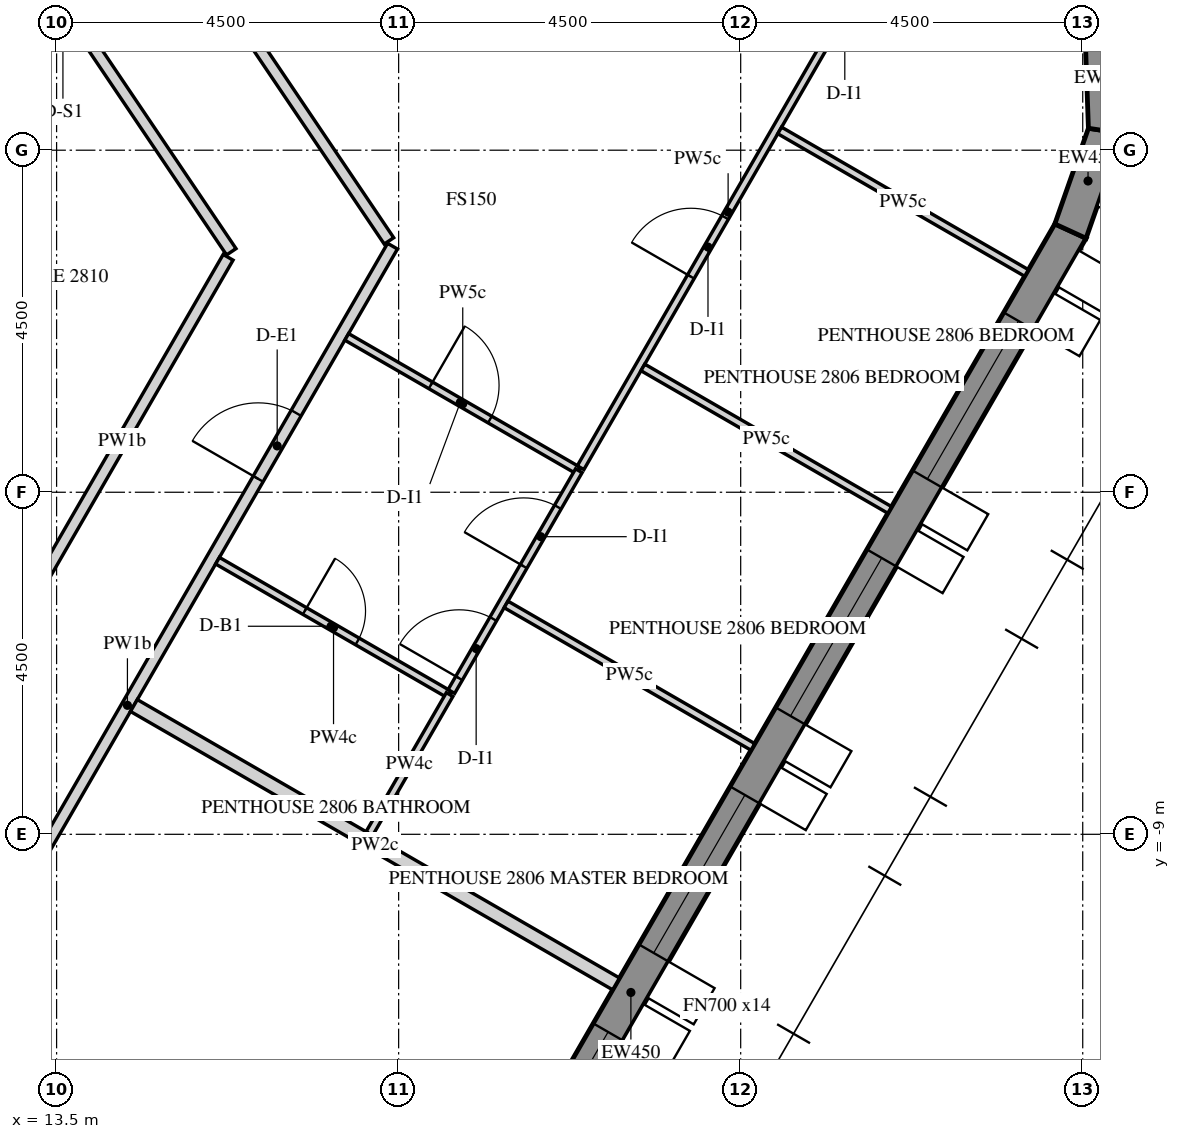
"""IFC4 building model, lengths in metres.
Left out: names, types, materials, properties, quantities, classifications, styles, units other than length and angle.
Written with IfcOpenShell. Run it as: python <this file> out.ifc"""

import sys

from ifc_helpers import new_model, si_unit, direction, frame, frame_2d, origin, place, context, subcontext, project, spatial, polyline, rectangle, outline, extrude, element, fill, save


model = new_model("IFC4")
c1 = context("Model", 3, precision=1e-05, world=origin(), true_north=direction((0.0, 1.0)))
c2 = subcontext(c1, "Body", "Model", "MODEL_VIEW")
j1 = project(units=[si_unit("LENGTHUNIT", "METRE"), si_unit("PLANEANGLEUNIT", "RADIAN")], contexts=[c1])
p1 = place(None, origin())
s1 = spatial("IfcSite", under=j1, at=p1, CompositionType="ELEMENT")
p2 = place(p1, origin())
s2 = spatial("IfcBuilding", under=s1, at=p2, CompositionType="ELEMENT")
p3 = place(p2, frame((0.0, 0.0, 361.2)))
s3 = spatial("IfcBuildingStorey", under=s2, at=p3, CompositionType="ELEMENT", Elevation=361.2)
p4 = place(p3, frame((15.273, -21.097, -0.15), z_axis=(0.0, 0.0, 1.0), x_axis=(0.499997453958, 0.866026873738, 0.0)))
e1 = element("IfcWall", 1, at=p4, inside=s3, PredefinedType="SOLIDWALL", context=c2, shape_type="SweptSolid", body=[
    extrude(outline(polyline([(-0.018, -0.225), (23.152, -0.225), (23.11, 0.225), (0.018, 0.225), (-0.018, -0.225)])), origin(), (0.0, 0.0, 1.0), 3.9),
])
p5 = place(p4, frame((1.366, 0.0, 0.45)))
e2 = element("IfcOpeningElement", 2, at=p5, cuts=e1, PredefinedType="OPENING", context=c2, shape_type="SweptSolid", body=[
    extrude(rectangle(XDim=2.4, YDim=3.0, at=frame_2d((1.2, 1.5))), frame((0.0, 0.235, 0.0), z_axis=(0.0, -1.0, 0.0), x_axis=(1.0, 0.0, 0.0)), (0.0, 0.0, 1.0), 0.47),
])
p6 = place(p4, frame((4.966, 0.0, 0.45)))
e3 = element("IfcOpeningElement", 3, at=p6, cuts=e1, PredefinedType="OPENING", context=c2, shape_type="SweptSolid", body=[
    extrude(rectangle(XDim=2.4, YDim=3.0, at=frame_2d((1.2, 1.5))), frame((0.0, 0.235, 0.0), z_axis=(0.0, -1.0, 0.0), x_axis=(1.0, 0.0, 0.0)), (0.0, 0.0, 1.0), 0.47),
])
p7 = place(p4, frame((8.566, 0.0, 0.45)))
e4 = element("IfcOpeningElement", 4, at=p7, cuts=e1, PredefinedType="OPENING", context=c2, shape_type="SweptSolid", body=[
    extrude(rectangle(XDim=2.4, YDim=3.0, at=frame_2d((1.2, 1.5))), frame((0.0, 0.235, 0.0), z_axis=(0.0, -1.0, 0.0), x_axis=(1.0, 0.0, 0.0)), (0.0, 0.0, 1.0), 0.47),
])
p8 = place(p4, frame((12.166, 0.0, 0.45)))
e5 = element("IfcOpeningElement", 5, at=p8, cuts=e1, PredefinedType="OPENING", context=c2, shape_type="SweptSolid", body=[
    extrude(rectangle(XDim=2.4, YDim=3.0, at=frame_2d((1.2, 1.5))), frame((0.0, 0.235, 0.0), z_axis=(0.0, -1.0, 0.0), x_axis=(1.0, 0.0, 0.0)), (0.0, 0.0, 1.0), 0.47),
])
p9 = place(p4, frame((15.766, 0.0, 0.45)))
e6 = element("IfcOpeningElement", 6, at=p9, cuts=e1, PredefinedType="OPENING", context=c2, shape_type="SweptSolid", body=[
    extrude(rectangle(XDim=2.4, YDim=3.0, at=frame_2d((1.2, 1.5))), frame((0.0, 0.235, 0.0), z_axis=(0.0, -1.0, 0.0), x_axis=(1.0, 0.0, 0.0)), (0.0, 0.0, 1.0), 0.47),
])
p10 = place(p4, frame((19.366, 0.0, 0.45)))
e7 = element("IfcOpeningElement", 7, at=p10, cuts=e1, PredefinedType="OPENING", context=c2, shape_type="SweptSolid", body=[
    extrude(rectangle(XDim=2.4, YDim=3.0, at=frame_2d((1.2, 1.5))), frame((0.0, 0.235, 0.0), z_axis=(0.0, -1.0, 0.0), x_axis=(1.0, 0.0, 0.0)), (0.0, 0.0, 1.0), 0.47),
])
p11 = place(p3, frame((26.838, -1.064, -0.15), z_axis=(0.0, 0.0, 1.0), x_axis=(0.331074067573, 0.943604769901, 0.0)))
e8 = element("IfcWall", 8, at=p11, inside=s3, PredefinedType="SOLIDWALL", context=c2, shape_type="SweptSolid", body=[
    extrude(outline(polyline([(-0.021, -0.225), (1.44, -0.225), (1.355, 0.225), (0.021, 0.225), (-0.021, -0.225)])), origin(), (0.0, 0.0, 1.0), 3.9),
])
p12 = place(p3, frame((27.301, 0.254, -0.15), z_axis=(0.0, 0.0, 1.0), x_axis=(-0.034763104447, 0.999395580623, 0.0)))
e9 = element("IfcWall", 9, at=p12, inside=s3, PredefinedType="SOLIDWALL", context=c2, shape_type="SweptSolid", body=[
    extrude(outline(polyline([(-0.042, -0.225), (1.44, -0.225), (1.355, 0.225), (0.042, 0.225), (-0.042, -0.225)])), origin(), (0.0, 0.0, 1.0), 3.9),
])
p13 = place(p3, frame((10.944, -13.344, 0.0), z_axis=(0.0, 0.0, 1.0), x_axis=(0.500003210163, 0.866023550388, 0.0)))
e10 = element("IfcWall", 10, at=p13, inside=s3, PredefinedType="PARTITIONING", context=c2, shape_type="SweptSolid", body=[
    extrude(rectangle(XDim=13.951, YDim=0.15, at=frame_2d((6.975, 0.0))), origin(), (0.0, 0.0, 1.0), 2.82),
])
p14 = place(p13, frame((1.116, 0.0, 0.0)))
e11 = element("IfcOpeningElement", 11, at=p14, cuts=e10, PredefinedType="OPENING", context=c2, shape_type="SweptSolid", body=[
    extrude(rectangle(XDim=1.0, YDim=2.1, at=frame_2d((0.5, 1.05))), frame((0.0, 0.085, 0.0), z_axis=(0.0, -1.0, 0.0), x_axis=(1.0, 0.0, 0.0)), (0.0, 0.0, 1.0), 0.17),
])
p15 = place(p13, frame((10.416, 0.0, 0.0)))
e12 = element("IfcOpeningElement", 12, at=p15, cuts=e10, PredefinedType="OPENING", context=c2, shape_type="SweptSolid", body=[
    extrude(rectangle(XDim=1.0, YDim=2.1, at=frame_2d((0.5, 1.05))), frame((0.0, 0.085, 0.0), z_axis=(0.0, -1.0, 0.0), x_axis=(1.0, 0.0, 0.0)), (0.0, 0.0, 1.0), 0.17),
])
p16 = place(p3, frame((17.873, -1.193, 0.0), z_axis=(0.0, 0.0, 1.0), x_axis=(-0.559188435605, 0.829040586151, 0.0)))
e13 = element("IfcWall", 13, at=p16, inside=s3, PredefinedType="PARTITIONING", context=c2, shape_type="SweptSolid", body=[
    extrude(rectangle(XDim=15.688, YDim=0.15, at=frame_2d((7.844, 0.0))), origin(), (0.0, 0.0, 1.0), 2.82),
])
p17 = place(p3, frame((11.368, 5.231, 0.0), z_axis=(0.0, 0.0, 1.0), x_axis=(0.55919388604, -0.829036909803, 0.0)))
e14 = element("IfcWall", 14, at=p17, inside=s3, PredefinedType="PARTITIONING", context=c2, shape_type="SweptSolid", body=[
    extrude(rectangle(XDim=7.922, YDim=0.15, at=frame_2d((3.961, 0.0))), origin(), (0.0, 0.0, 1.0), 2.82),
])
p18 = place(p17, frame((3.511, 0.0, 0.0)))
e15 = element("IfcOpeningElement", 15, at=p18, cuts=e14, PredefinedType="OPENING", context=c2, shape_type="SweptSolid", body=[
    extrude(rectangle(XDim=0.9, YDim=2.1, at=frame_2d((0.45, 1.05))), frame((0.0, 0.085, 0.0), z_axis=(0.0, -1.0, 0.0), x_axis=(1.0, 0.0, 0.0)), (0.0, 0.0, 1.0), 0.17),
])
p19 = place(p3, frame((15.757, -1.409, 0.0), z_axis=(0.0, 0.0, 1.0), x_axis=(-0.500002739321, -0.866023822231, 0.0)))
e16 = element("IfcWall", 16, at=p19, inside=s3, PredefinedType="PARTITIONING", context=c2, shape_type="SweptSolid", body=[
    extrude(rectangle(XDim=5.58, YDim=0.15, at=frame_2d((2.79, 0.0))), origin(), (0.0, 0.0, 1.0), 2.82),
])
p20 = place(p3, frame((20.861, -10.968, 0.0), z_axis=(0.0, 0.0, 1.0), x_axis=(-0.866015186145, 0.500017697054, 0.0)))
e17 = element("IfcWall", 17, at=p20, inside=s3, PredefinedType="PARTITIONING", context=c2, shape_type="SweptSolid", body=[
    extrude(rectangle(XDim=7.325, YDim=0.18, at=frame_2d((3.663, 0.0))), origin(), (0.0, 0.0, 1.0), 2.82),
])
p21 = place(p3, frame((17.317, -2.456, 0.0), z_axis=(0.0, 0.0, 1.0), x_axis=(0.866031034943, -0.499990246421, 0.0)))
e18 = element("IfcWall", 18, at=p21, inside=s3, PredefinedType="PARTITIONING", context=c2, shape_type="SweptSolid", body=[
    extrude(rectangle(XDim=3.525, YDim=0.1, at=frame_2d((1.762, 0.0))), origin(), (0.0, 0.0, 1.0), 2.82),
])
p22 = place(p21, frame((1.275, 0.0, 0.0)))
e19 = element("IfcOpeningElement", 19, at=p22, cuts=e18, PredefinedType="OPENING", context=c2, shape_type="SweptSolid", body=[
    extrude(rectangle(XDim=0.9, YDim=2.1, at=frame_2d((0.45, 1.05))), frame((0.0, 0.06, 0.0), z_axis=(0.0, -1.0, 0.0), x_axis=(1.0, 0.0, 0.0)), (0.0, 0.0, 1.0), 0.12),
])
p23 = place(p3, frame((20.394, -4.177, 0.0), z_axis=(0.0, 0.0, 1.0), x_axis=(0.499991012162, 0.866030592853, 0.0)))
e20 = element("IfcWall", 20, at=p23, inside=s3, PredefinedType="PARTITIONING", context=c2, shape_type="SweptSolid", body=[
    extrude(rectangle(XDim=7.764, YDim=0.1, at=frame_2d((3.882, 0.0))), origin(), (0.0, 0.0, 1.0), 2.82),
])
p24 = place(p23, frame((2.902, 0.0, 0.0)))
e21 = element("IfcOpeningElement", 21, at=p24, cuts=e20, PredefinedType="OPENING", context=c2, shape_type="SweptSolid", body=[
    extrude(rectangle(XDim=0.9, YDim=2.1, at=frame_2d((0.45, 1.05))), frame((0.0, 0.06, 0.0), z_axis=(0.0, -1.0, 0.0), x_axis=(1.0, 0.0, 0.0)), (0.0, 0.0, 1.0), 0.12),
])
p25 = place(p23, frame((6.502, 0.0, 0.0)))
e22 = element("IfcOpeningElement", 22, at=p25, cuts=e20, PredefinedType="OPENING", context=c2, shape_type="SweptSolid", body=[
    extrude(rectangle(XDim=0.9, YDim=2.1, at=frame_2d((0.45, 1.05))), frame((0.0, 0.06, 0.0), z_axis=(0.0, -1.0, 0.0), x_axis=(1.0, 0.0, 0.0)), (0.0, 0.0, 1.0), 0.12),
])
p26 = place(p3, frame((15.617, -5.4, 0.0), z_axis=(0.0, 0.0, 1.0), x_axis=(0.866031034943, -0.499990246421, 0.0)))
e23 = element("IfcWall", 23, at=p26, inside=s3, PredefinedType="PARTITIONING", context=c2, shape_type="SweptSolid", body=[
    extrude(rectangle(XDim=3.525, YDim=0.1, at=frame_2d((1.762, 0.0))), origin(), (0.0, 0.0, 1.0), 2.82),
])
p27 = place(p26, frame((1.325, 0.0, 0.0)))
e24 = element("IfcOpeningElement", 24, at=p27, cuts=e23, PredefinedType="OPENING", context=c2, shape_type="SweptSolid", body=[
    extrude(rectangle(XDim=0.8, YDim=2.1, at=frame_2d((0.4, 1.05))), frame((0.0, 0.06, 0.0), z_axis=(0.0, -1.0, 0.0), x_axis=(1.0, 0.0, 0.0)), (0.0, 0.0, 1.0), 0.12),
])
p28 = place(p3, frame((18.694, -7.121, 0.0), z_axis=(0.0, 0.0, 1.0), x_axis=(0.500014404596, 0.866017087127, 0.0)))
e25 = element("IfcWall", 25, at=p28, inside=s3, PredefinedType="PARTITIONING", context=c2, shape_type="SweptSolid", body=[
    extrude(rectangle(XDim=3.354, YDim=0.1, at=frame_2d((1.677, 0.0))), origin(), (0.0, 0.0, 1.0), 2.82),
])
p29 = place(p28, frame((0.202, 0.0, 0.0)))
e26 = element("IfcOpeningElement", 26, at=p29, cuts=e25, PredefinedType="OPENING", context=c2, shape_type="SweptSolid", body=[
    extrude(rectangle(XDim=0.9, YDim=2.1, at=frame_2d((0.45, 1.05))), frame((0.0, 0.06, 0.0), z_axis=(0.0, -1.0, 0.0), x_axis=(1.0, 0.0, 0.0)), (0.0, 0.0, 1.0), 0.12),
])
p30 = place(p28, frame((1.902, 0.0, 0.0)))
e27 = element("IfcOpeningElement", 27, at=p30, cuts=e25, PredefinedType="OPENING", context=c2, shape_type="SweptSolid", body=[
    extrude(rectangle(XDim=0.9, YDim=2.1, at=frame_2d((0.45, 1.05))), frame((0.0, 0.06, 0.0), z_axis=(0.0, -1.0, 0.0), x_axis=(1.0, 0.0, 0.0)), (0.0, 0.0, 1.0), 0.12),
])
p31 = place(p3, frame((17.615, -8.99, 0.0), z_axis=(0.0, 0.0, 1.0), x_axis=(0.500042633337, 0.866000788017, 0.0)))
e28 = element("IfcWall", 28, at=p31, inside=s3, PredefinedType="PARTITIONING", context=c2, shape_type="SweptSolid", body=[
    extrude(rectangle(XDim=2.112, YDim=0.1, at=frame_2d((1.056, 0.0))), origin(), (0.0, 0.0, 1.0), 2.82),
])
for number, where, z_axis, x_axis in (
    (29, (22.661, -7.851, 0.0), (0.0, 0.0, 1.0), (-0.866, 0.5, 0.0)),
    (30, (24.461, -4.733, 0.0), (0.0, 0.0, 1.0), (-0.866, 0.5, 0.0)),
    (31, (26.261, -1.615, 0.0), (0.0, 0.0, 1.0), (-0.866, 0.5, 0.0)),
):
    element("IfcWall", number, at=place(p3, frame(where, z_axis=z_axis, x_axis=x_axis)), inside=s3, PredefinedType="PARTITIONING", context=c2, shape_type="SweptSolid", body=[
        extrude(rectangle(XDim=3.75, YDim=0.1, at=frame_2d((1.875, 0.0))), origin(), (0.0, 0.0, 1.0), 2.82),
    ])
p32 = place(p7, frame((0.0, 0.155, 0.0)))
e32 = element("IfcWindow", 32, at=p32, inside=s3, PartitioningType="DOUBLE_PANEL_VERTICAL", PredefinedType="WINDOW", context=c2, shape_type="SweptSolid", body=[
    extrude(rectangle(XDim=2.4, YDim=3.0, at=frame_2d((1.2, 1.5))), frame((0.0, 0.03, 0.0), z_axis=(0.0, -1.0, 0.0), x_axis=(1.0, 0.0, 0.0)), (0.0, 0.0, 1.0), 0.06),
])
fill(e4, e32)
p33 = place(p8, frame((0.0, 0.155, 0.0)))
e33 = element("IfcWindow", 33, at=p33, inside=s3, PartitioningType="DOUBLE_PANEL_VERTICAL", PredefinedType="WINDOW", context=c2, shape_type="SweptSolid", body=[
    extrude(rectangle(XDim=2.4, YDim=3.0, at=frame_2d((1.2, 1.5))), frame((0.0, 0.03, 0.0), z_axis=(0.0, -1.0, 0.0), x_axis=(1.0, 0.0, 0.0)), (0.0, 0.0, 1.0), 0.06),
])
fill(e5, e33)
p34 = place(p9, frame((0.0, 0.155, 0.0)))
e34 = element("IfcWindow", 34, at=p34, inside=s3, PartitioningType="DOUBLE_PANEL_VERTICAL", PredefinedType="WINDOW", context=c2, shape_type="SweptSolid", body=[
    extrude(rectangle(XDim=2.4, YDim=3.0, at=frame_2d((1.2, 1.5))), frame((0.0, 0.03, 0.0), z_axis=(0.0, -1.0, 0.0), x_axis=(1.0, 0.0, 0.0)), (0.0, 0.0, 1.0), 0.06),
])
fill(e6, e34)
p35 = place(p10, frame((0.0, 0.155, 0.0)))
e35 = element("IfcWindow", 35, at=p35, inside=s3, PartitioningType="DOUBLE_PANEL_VERTICAL", PredefinedType="WINDOW", context=c2, shape_type="SweptSolid", body=[
    extrude(rectangle(XDim=2.4, YDim=3.0, at=frame_2d((1.2, 1.5))), frame((0.0, 0.03, 0.0), z_axis=(0.0, -1.0, 0.0), x_axis=(1.0, 0.0, 0.0)), (0.0, 0.0, 1.0), 0.06),
])
fill(e7, e35)
p36 = place(p15, origin())
e36 = element("IfcDoor", 36, at=p36, inside=s3, OperationType="SINGLE_SWING_RIGHT", PredefinedType="DOOR", context=c2, shape_type="SweptSolid", body=[
    extrude(rectangle(XDim=1.0, YDim=2.1, at=frame_2d((0.5, 1.05))), frame((0.0, 0.025, 0.0), z_axis=(0.0, -1.0, 0.0), x_axis=(1.0, 0.0, 0.0)), (0.0, 0.0, 1.0), 0.05),
])
fill(e12, e36)
p37 = place(p27, origin())
e37 = element("IfcDoor", 37, at=p37, inside=s3, OperationType="SINGLE_SWING_RIGHT", PredefinedType="DOOR", context=c2, shape_type="SweptSolid", body=[
    extrude(rectangle(XDim=0.8, YDim=2.1, at=frame_2d((0.4, 1.05))), frame((0.0, 0.025, 0.0), z_axis=(0.0, -1.0, 0.0), x_axis=(1.0, 0.0, 0.0)), (0.0, 0.0, 1.0), 0.05),
])
fill(e24, e37)
p38 = place(p22, origin())
e38 = element("IfcDoor", 38, at=p38, inside=s3, OperationType="SINGLE_SWING_RIGHT", PredefinedType="DOOR", context=c2, shape_type="SweptSolid", body=[
    extrude(rectangle(XDim=0.9, YDim=2.1, at=frame_2d((0.45, 1.05))), frame((0.0, 0.025, 0.0), z_axis=(0.0, -1.0, 0.0), x_axis=(1.0, 0.0, 0.0)), (0.0, 0.0, 1.0), 0.05),
])
fill(e19, e38)
p39 = place(p29, origin())
e39 = element("IfcDoor", 39, at=p39, inside=s3, OperationType="SINGLE_SWING_RIGHT", PredefinedType="DOOR", context=c2, shape_type="SweptSolid", body=[
    extrude(rectangle(XDim=0.9, YDim=2.1, at=frame_2d((0.45, 1.05))), frame((0.0, 0.025, 0.0), z_axis=(0.0, -1.0, 0.0), x_axis=(1.0, 0.0, 0.0)), (0.0, 0.0, 1.0), 0.05),
])
fill(e26, e39)
p40 = place(p30, origin())
e40 = element("IfcDoor", 40, at=p40, inside=s3, OperationType="SINGLE_SWING_LEFT", PredefinedType="DOOR", context=c2, shape_type="SweptSolid", body=[
    extrude(rectangle(XDim=0.9, YDim=2.1, at=frame_2d((0.45, 1.05))), frame((0.0, 0.025, 0.0), z_axis=(0.0, -1.0, 0.0), x_axis=(1.0, 0.0, 0.0)), (0.0, 0.0, 1.0), 0.05),
])
fill(e27, e40)
p41 = place(p24, origin())
e41 = element("IfcDoor", 41, at=p41, inside=s3, OperationType="SINGLE_SWING_LEFT", PredefinedType="DOOR", context=c2, shape_type="SweptSolid", body=[
    extrude(rectangle(XDim=0.9, YDim=2.1, at=frame_2d((0.45, 1.05))), frame((0.0, 0.025, 0.0), z_axis=(0.0, -1.0, 0.0), x_axis=(1.0, 0.0, 0.0)), (0.0, 0.0, 1.0), 0.05),
])
fill(e21, e41)
save(model, sys.argv[1])
